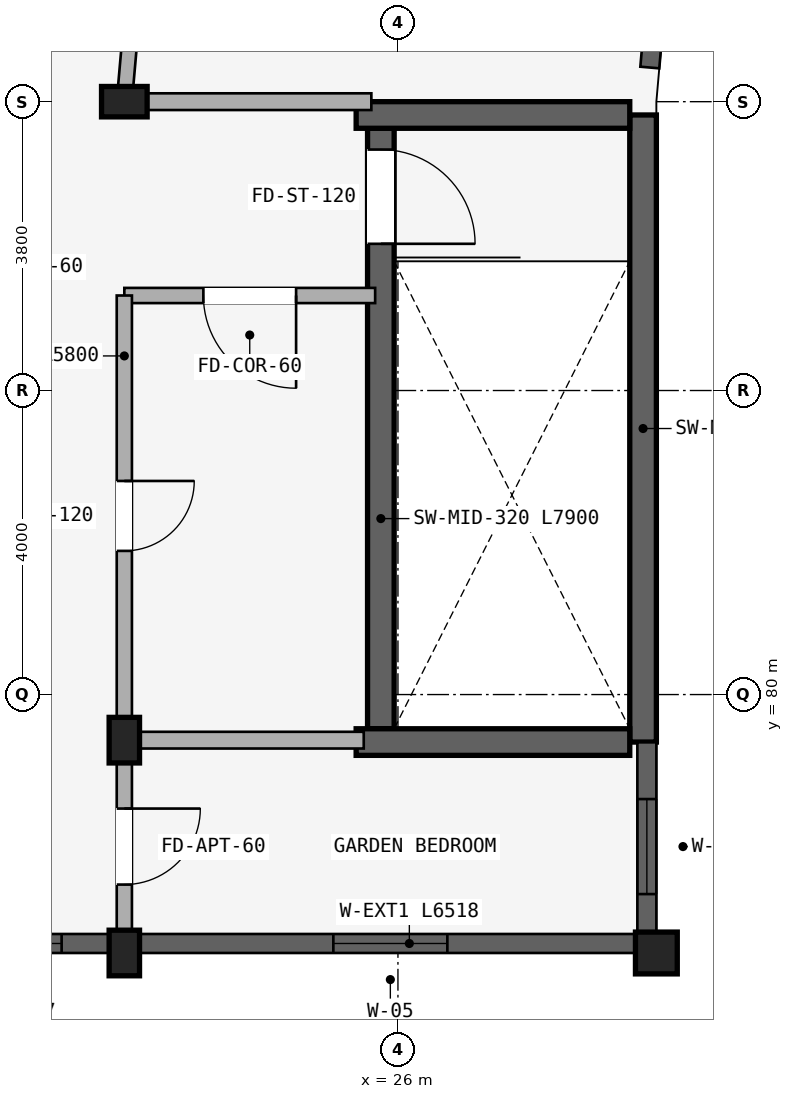
"""IFC4 building model, lengths in metres.
Left out: names, types, materials, properties, quantities, classifications, styles, units other than length and angle.
Written with IfcOpenShell. Run it as: python <this file> out.ifc"""

import sys

from ifc_helpers import new_model, si_unit, direction, frame, frame_2d, origin, origin_2d, place, context, subcontext, project, spatial, rectangle, extrude, element, fill, save


model = new_model("IFC4")
c1 = context("Model", 3, precision=1e-05, world=origin(), true_north=direction((0.0, 1.0)))
c2 = subcontext(c1, "Body", "Model", "MODEL_VIEW")
j1 = project(units=[si_unit("LENGTHUNIT", "METRE"), si_unit("PLANEANGLEUNIT", "RADIAN")], contexts=[c1])
p1 = place(None, origin())
s1 = spatial("IfcSite", under=j1, at=p1, CompositionType="ELEMENT")
p2 = place(p1, origin())
s2 = spatial("IfcBuilding", under=s1, at=p2, CompositionType="ELEMENT")
p3 = place(p2, frame((0.0, 0.0, 49.65)))
s3 = spatial("IfcBuildingStorey", under=s2, at=p3, CompositionType="ELEMENT", Elevation=49.65)
p4 = place(p3, frame((29.225, 87.625, 0.0), z_axis=(0.0, 0.0, 1.0), x_axis=(0.0, -1.0, 0.0)))
e1 = element("IfcWall", 1, at=p4, inside=s3, PredefinedType="SHEAR", context=c2, shape_type="SweptSolid", body=[
    extrude(rectangle(XDim=8.25, YDim=0.35, at=frame_2d((4.125, 0.0))), origin(), (0.0, 0.0, 1.0), 2.91),
])
p5 = place(p3, frame((25.775, 87.45, 0.0), z_axis=(0.0, 0.0, 1.0), x_axis=(0.0, -1.0, 0.0)))
e2 = element("IfcWall", 2, at=p5, inside=s3, PredefinedType="SHEAR", context=c2, shape_type="SweptSolid", body=[
    extrude(rectangle(XDim=7.9, YDim=0.35, at=frame_2d((3.95, 0.0))), origin(), (0.0, 0.0, 1.0), 2.91),
])
p6 = place(p5, frame((0.28, 0.0, 0.0)))
e3 = element("IfcOpeningElement", 3, at=p6, cuts=e2, PredefinedType="OPENING", context=c2, shape_type="SweptSolid", body=[
    extrude(rectangle(XDim=1.24, YDim=2.15, at=frame_2d((0.62, 1.075))), frame((0.0, 0.185, 0.0), z_axis=(0.0, -1.0, 0.0), x_axis=(1.0, 0.0, 0.0)), (0.0, 0.0, 1.0), 0.37),
])
for number, where, z_axis, x_axis in (
    (4, (29.05, 87.625, 0.0), (0.0, 0.0, 1.0), (-1.0, 0.0, 0.0)),
    (5, (29.05, 79.375, 0.0), (0.0, 0.0, 1.0), (-1.0, 0.0, 0.0)),
):
    element("IfcWall", number, at=place(p3, frame(where, z_axis=z_axis, x_axis=x_axis)), inside=s3, PredefinedType="SHEAR", context=c2, shape_type="SweptSolid", body=[
        extrude(rectangle(XDim=3.6, YDim=0.35, at=frame_2d((1.8, 0.0))), origin(), (0.0, 0.0, 1.0), 2.91),
    ])
for number, where, z_axis, x_axis in (
    (6, (22.4, 87.8, 0.0), (0.0, 0.0, 1.0), (0.0, 1.0, 0.0)),
    (7, (22.4, 79.4, 0.0), (0.0, 0.0, 1.0), (1.0, 0.0, 0.0)),
):
    element("IfcColumn", number, at=place(p3, frame(where, z_axis=z_axis, x_axis=x_axis)), inside=s3, PredefinedType="COLUMN", context=c2, shape_type="SweptSolid", body=[
        extrude(rectangle(XDim=0.4, YDim=0.6, at=origin_2d()), origin(), (0.0, 0.0, 1.0), 2.91),
    ])
p7 = place(p3, frame((29.4, 76.6, 0.0), z_axis=(0.0, 0.0, 1.0), x_axis=(1.0, 0.0, 0.0)))
e8 = element("IfcColumn", 8, at=p7, inside=s3, PredefinedType="COLUMN", context=c2, shape_type="SweptSolid", body=[
    extrude(rectangle(XDim=0.55, YDim=0.55, at=origin_2d()), origin(), (0.0, 0.0, 1.0), 2.91),
])
p8 = place(p3, frame((22.4, 76.6, 0.0), z_axis=(0.0, 0.0, 1.0), x_axis=(1.0, 0.0, 0.0)))
e9 = element("IfcColumn", 9, at=p8, inside=s3, PredefinedType="COLUMN", context=c2, shape_type="SweptSolid", body=[
    extrude(rectangle(XDim=0.4, YDim=0.6, at=origin_2d()), origin(), (0.0, 0.0, 1.0), 2.91),
])
p9 = place(p3, frame((25.7, 85.25, 0.0), z_axis=(0.0, 0.0, 1.0), x_axis=(-1.0, 0.0, 0.0)))
e10 = element("IfcWall", 10, at=p9, inside=s3, PredefinedType="STANDARD", context=c2, shape_type="SweptSolid", body=[
    extrude(rectangle(XDim=3.3, YDim=0.2, at=frame_2d((1.65, 0.0))), origin(), (0.0, 0.0, 1.0), 2.352),
])
p10 = place(p9, frame((1.04, 0.0, 0.0)))
e11 = element("IfcOpeningElement", 11, at=p10, cuts=e10, PredefinedType="OPENING", context=c2, shape_type="SweptSolid", body=[
    extrude(rectangle(XDim=1.22, YDim=2.15, at=frame_2d((0.61, 1.075))), frame((0.0, 0.11, 0.0), z_axis=(0.0, -1.0, 0.0), x_axis=(1.0, 0.0, 0.0)), (0.0, 0.0, 1.0), 0.22),
])
p11 = place(p3, frame((22.4, 85.25, 0.0), z_axis=(0.0, 0.0, 1.0), x_axis=(0.0, -1.0, 0.0)))
e12 = element("IfcWall", 12, at=p11, inside=s3, PredefinedType="STANDARD", context=c2, shape_type="SweptSolid", body=[
    extrude(rectangle(XDim=5.8, YDim=0.2, at=frame_2d((2.9, 0.0))), origin(), (0.0, 0.0, 1.0), 2.352),
])
p12 = place(p11, frame((2.44, 0.0, 0.0)))
e13 = element("IfcOpeningElement", 13, at=p12, cuts=e12, PredefinedType="OPENING", context=c2, shape_type="SweptSolid", body=[
    extrude(rectangle(XDim=0.92, YDim=2.1, at=frame_2d((0.46, 1.05))), frame((0.0, 0.11, 0.0), z_axis=(0.0, -1.0, 0.0), x_axis=(1.0, 0.0, 0.0)), (0.0, 0.0, 1.0), 0.22),
])
p13 = place(p3, frame((22.792, 92.28, 0.0), z_axis=(0.0, 0.0, 1.0), x_axis=(-0.087187153726, -0.996191949488, 0.0)))
e14 = element("IfcWall", 14, at=p13, inside=s3, PredefinedType="STANDARD", context=c2, shape_type="SweptSolid", body=[
    extrude(rectangle(XDim=4.497, YDim=0.2, at=frame_2d((2.249, 0.0))), origin(), (0.0, 0.0, 1.0), 2.352),
])
p14 = place(p3, frame((25.65, 87.8, 0.0), z_axis=(0.0, 0.0, 1.0), x_axis=(-1.0, 0.0, 0.0)))
e15 = element("IfcWall", 15, at=p14, inside=s3, PredefinedType="STANDARD", context=c2, shape_type="SweptSolid", body=[
    extrude(rectangle(XDim=3.2, YDim=0.22, at=frame_2d((1.6, 0.0))), origin(), (0.0, 0.0, 1.0), 2.352),
])
p15 = place(p3, frame((22.4, 79.4, 0.0), z_axis=(0.0, 0.0, 1.0), x_axis=(0.0, -1.0, 0.0)))
e16 = element("IfcWall", 16, at=p15, inside=s3, PredefinedType="STANDARD", context=c2, shape_type="SweptSolid", body=[
    extrude(rectangle(XDim=2.8, YDim=0.2, at=frame_2d((1.4, 0.0))), origin(), (0.0, 0.0, 1.0), 2.352),
])
p16 = place(p15, frame((0.9, 0.0, 0.0)))
e17 = element("IfcOpeningElement", 17, at=p16, cuts=e16, PredefinedType="OPENING", context=c2, shape_type="SweptSolid", body=[
    extrude(rectangle(XDim=1.0, YDim=2.15, at=frame_2d((0.5, 1.075))), frame((0.0, 0.11, 0.0), z_axis=(0.0, -1.0, 0.0), x_axis=(1.0, 0.0, 0.0)), (0.0, 0.0, 1.0), 0.22),
])
p17 = place(p3, frame((25.55, 79.4, 0.0), z_axis=(0.0, 0.0, 1.0), x_axis=(-1.0, 0.0, 0.0)))
e18 = element("IfcWall", 18, at=p17, inside=s3, PredefinedType="STANDARD", context=c2, shape_type="SweptSolid", body=[
    extrude(rectangle(XDim=3.1, YDim=0.22, at=frame_2d((1.55, 0.0))), origin(), (0.0, 0.0, 1.0), 2.352),
])
p18 = place(p3, frame((29.541, 90.848, 0.0), z_axis=(0.0, 0.0, 1.0), x_axis=(-0.087227322402, -0.996188433092, 0.0)))
e19 = element("IfcWall", 19, at=p18, inside=s3, PredefinedType="STANDARD", context=c2, shape_type="SweptSolid", body=[
    extrude(rectangle(XDim=2.609, YDim=0.25, at=frame_2d((1.304, 0.0))), origin(), (0.0, 0.0, 1.0), 2.402),
])
p19 = place(p18, frame((0.81, 0.0, 0.702)))
e20 = element("IfcOpeningElement", 20, at=p19, cuts=e19, PredefinedType="OPENING", context=c2, shape_type="SweptSolid", body=[
    extrude(rectangle(XDim=1.2, YDim=1.5, at=frame_2d((0.6, 0.75))), frame((0.0, 0.135, 0.0), z_axis=(0.0, -1.0, 0.0), x_axis=(1.0, 0.0, 0.0)), (0.0, 0.0, 1.0), 0.27),
])
p20 = place(p3, frame((29.275, 79.372, 0.0), z_axis=(0.0, 0.0, 1.0), x_axis=(0.0, -1.0, 0.0)))
e21 = element("IfcWall", 21, at=p20, inside=s3, PredefinedType="STANDARD", context=c2, shape_type="SweptSolid", body=[
    extrude(rectangle(XDim=2.493, YDim=0.25, at=frame_2d((1.247, 0.0))), origin(), (0.0, 0.0, 1.0), 2.452),
])
p21 = place(p20, frame((0.747, 0.0, 0.702)))
e22 = element("IfcOpeningElement", 22, at=p21, cuts=e21, PredefinedType="OPENING", context=c2, shape_type="SweptSolid", body=[
    extrude(rectangle(XDim=1.25, YDim=1.55, at=frame_2d((0.625, 0.775))), frame((0.0, 0.135, 0.0), z_axis=(0.0, -1.0, 0.0), x_axis=(1.0, 0.0, 0.0)), (0.0, 0.0, 1.0), 0.27),
])
p22 = place(p3, frame((29.122, 76.725, 0.0), z_axis=(0.0, 0.0, 1.0), x_axis=(-1.0, 0.0, 0.0)))
e23 = element("IfcWall", 23, at=p22, inside=s3, PredefinedType="STANDARD", context=c2, shape_type="SweptSolid", body=[
    extrude(rectangle(XDim=6.518, YDim=0.25, at=frame_2d((3.259, 0.0))), origin(), (0.0, 0.0, 1.0), 2.352),
])
p23 = place(p22, frame((2.471, 0.0, 0.502)))
e24 = element("IfcOpeningElement", 24, at=p23, cuts=e23, PredefinedType="OPENING", context=c2, shape_type="SweptSolid", body=[
    extrude(rectangle(XDim=1.5, YDim=1.65, at=frame_2d((0.75, 0.825))), frame((0.0, 0.135, 0.0), z_axis=(0.0, -1.0, 0.0), x_axis=(1.0, 0.0, 0.0)), (0.0, 0.0, 1.0), 0.27),
])
p24 = place(p3, frame((22.197, 76.725, 0.0), z_axis=(0.0, 0.0, 1.0), x_axis=(-1.0, 0.0, 0.0)))
e25 = element("IfcWall", 25, at=p24, inside=s3, PredefinedType="STANDARD", context=c2, shape_type="SweptSolid", body=[
    extrude(rectangle(XDim=1.993, YDim=0.25, at=frame_2d((0.997, 0.0))), origin(), (0.0, 0.0, 1.0), 2.352),
])
p25 = place(p24, frame((0.622, 0.0, 0.88)))
e26 = element("IfcOpeningElement", 26, at=p25, cuts=e25, PredefinedType="OPENING", context=c2, shape_type="SweptSolid", body=[
    extrude(rectangle(XDim=0.75, YDim=1.05, at=frame_2d((0.375, 0.525))), frame((0.0, 0.135, 0.0), z_axis=(0.0, -1.0, 0.0), x_axis=(1.0, 0.0, 0.0)), (0.0, 0.0, 1.0), 0.27),
])
p26 = place(p21, origin())
e27 = element("IfcWindow", 27, at=p26, inside=s3, PartitioningType="SINGLE_PANEL", PredefinedType="WINDOW", context=c2, shape_type="SweptSolid", body=[
    extrude(rectangle(XDim=1.25, YDim=1.55, at=frame_2d((0.625, 0.775))), frame((0.0, 0.03, 0.0), z_axis=(0.0, -1.0, 0.0), x_axis=(1.0, 0.0, 0.0)), (0.0, 0.0, 1.0), 0.06),
])
fill(e22, e27)
p27 = place(p23, origin())
e28 = element("IfcWindow", 28, at=p27, inside=s3, PartitioningType="DOUBLE_PANEL_VERTICAL", PredefinedType="WINDOW", context=c2, shape_type="SweptSolid", body=[
    extrude(rectangle(XDim=1.5, YDim=1.65, at=frame_2d((0.75, 0.825))), frame((0.0, 0.03, 0.0), z_axis=(0.0, -1.0, 0.0), x_axis=(1.0, 0.0, 0.0)), (0.0, 0.0, 1.0), 0.06),
])
fill(e24, e28)
p28 = place(p25, origin())
e29 = element("IfcWindow", 29, at=p28, inside=s3, PartitioningType="SINGLE_PANEL", PredefinedType="WINDOW", context=c2, shape_type="SweptSolid", body=[
    extrude(rectangle(XDim=0.75, YDim=1.05, at=frame_2d((0.375, 0.525))), frame((0.0, 0.03, 0.0), z_axis=(0.0, -1.0, 0.0), x_axis=(1.0, 0.0, 0.0)), (0.0, 0.0, 1.0), 0.06),
])
fill(e26, e29)
p29 = place(p6, origin())
e30 = element("IfcDoor", 30, at=p29, inside=s3, OperationType="SINGLE_SWING_RIGHT", PredefinedType="DOOR", context=c2, shape_type="SweptSolid", body=[
    extrude(rectangle(XDim=1.24, YDim=2.15, at=frame_2d((0.62, 1.075))), frame((0.0, 0.025, 0.0), z_axis=(0.0, -1.0, 0.0), x_axis=(1.0, 0.0, 0.0)), (0.0, 0.0, 1.0), 0.05),
])
fill(e3, e30)
p30 = place(p10, frame((1.22, 0.0, 0.0), z_axis=(0.0, 0.0, 1.0), x_axis=(-1.0, 0.0, 0.0)))
e31 = element("IfcDoor", 31, at=p30, inside=s3, OperationType="SINGLE_SWING_RIGHT", PredefinedType="DOOR", context=c2, shape_type="SweptSolid", body=[
    extrude(rectangle(XDim=1.22, YDim=2.15, at=frame_2d((0.61, 1.075))), frame((0.0, 0.025, 0.0), z_axis=(0.0, -1.0, 0.0), x_axis=(1.0, 0.0, 0.0)), (0.0, 0.0, 1.0), 0.05),
])
fill(e11, e31)
p31 = place(p12, origin())
e32 = element("IfcDoor", 32, at=p31, inside=s3, OperationType="SINGLE_SWING_LEFT", PredefinedType="DOOR", context=c2, shape_type="SweptSolid", body=[
    extrude(rectangle(XDim=0.92, YDim=2.1, at=frame_2d((0.46, 1.05))), frame((0.0, 0.025, 0.0), z_axis=(0.0, -1.0, 0.0), x_axis=(1.0, 0.0, 0.0)), (0.0, 0.0, 1.0), 0.05),
])
fill(e13, e32)
p32 = place(p16, frame((1.0, 0.0, 0.0), z_axis=(0.0, 0.0, 1.0), x_axis=(-1.0, 0.0, 0.0)))
e33 = element("IfcDoor", 33, at=p32, inside=s3, OperationType="SINGLE_SWING_RIGHT", PredefinedType="DOOR", context=c2, shape_type="SweptSolid", body=[
    extrude(rectangle(XDim=1.0, YDim=2.15, at=frame_2d((0.5, 1.075))), frame((0.0, 0.025, 0.0), z_axis=(0.0, -1.0, 0.0), x_axis=(1.0, 0.0, 0.0)), (0.0, 0.0, 1.0), 0.05),
])
fill(e17, e33)
save(model, sys.argv[1])
